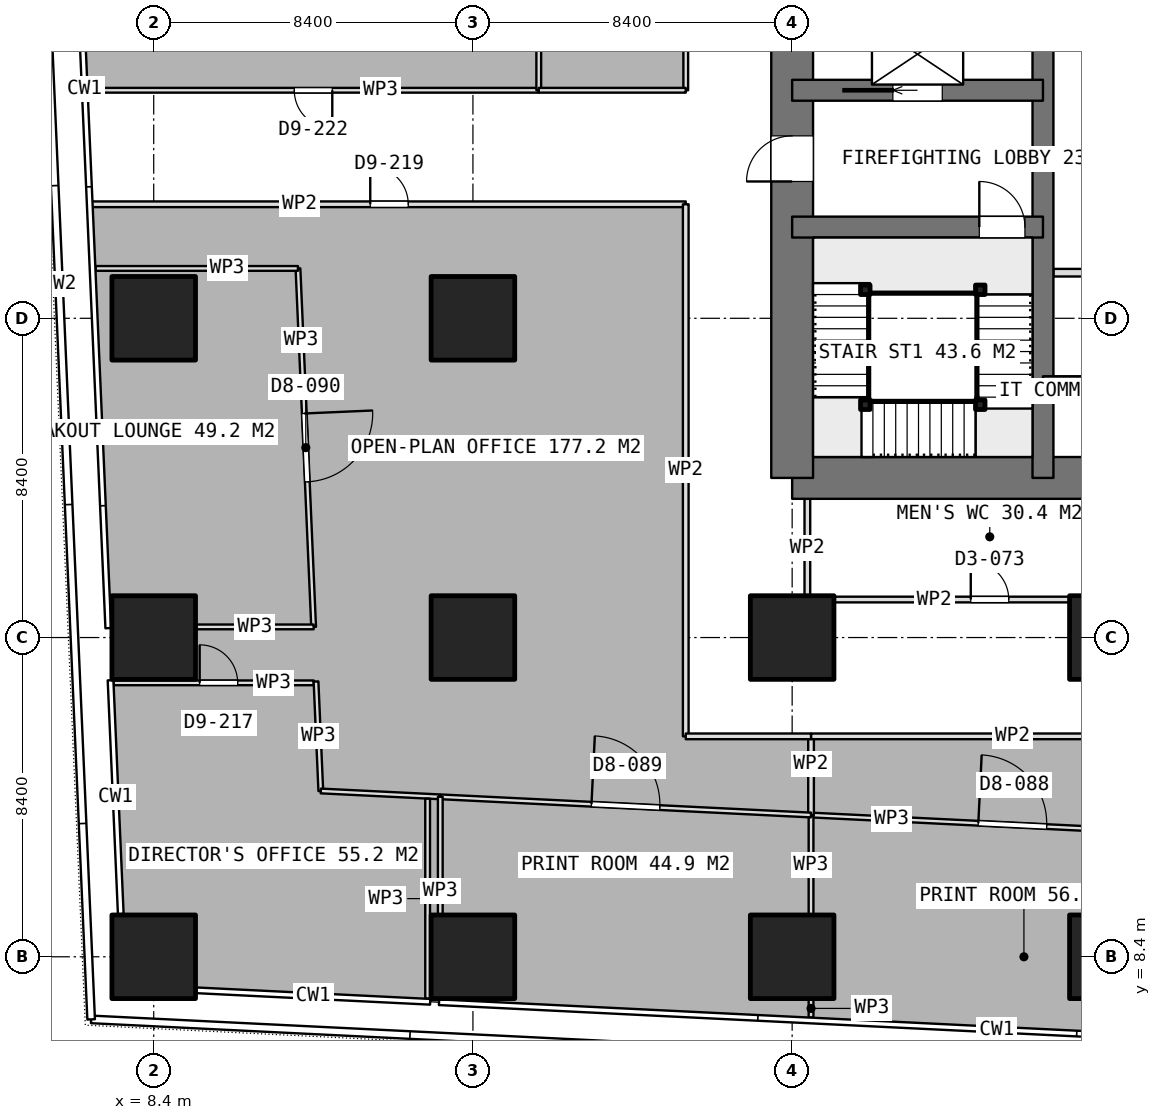
"""IFC4 building model, lengths in metres.
Left out: names, types, materials, properties, quantities, classifications, styles, units other than length and angle.
Written with IfcOpenShell. Run it as: python <this file> out.ifc"""

import sys

from ifc_helpers import new_model, si_unit, direction, frame, frame_2d, origin, origin_2d, place, context, subcontext, project, spatial, rectangle, extrude, element, fill, save


model = new_model("IFC4")
c1 = context("Model", 3, precision=1e-05, world=origin(), true_north=direction((0.0, 1.0)))
c2 = subcontext(c1, "Body", "Model", "MODEL_VIEW")
j1 = project(units=[si_unit("LENGTHUNIT", "METRE"), si_unit("PLANEANGLEUNIT", "RADIAN")], contexts=[c1])
p1 = place(None, origin())
s1 = spatial("IfcSite", under=j1, at=p1, CompositionType="ELEMENT")
p2 = place(p1, origin())
s2 = spatial("IfcBuilding", under=s1, at=p2, CompositionType="ELEMENT")
p3 = place(p2, frame((0.0, 0.0, 66.65)))
s3 = spatial("IfcBuildingStorey", under=s2, at=p3, CompositionType="ELEMENT", Elevation=66.65)
p4 = place(p3, frame((25.2, 21.0, 0.0), z_axis=(0.0, 0.0, 1.0), x_axis=(1.0, 0.0, 0.0)))
e1 = element("IfcWall", 1, at=p4, inside=s3, PredefinedType="SHEAR", context=c2, shape_type="SweptSolid", body=[
    extrude(rectangle(XDim=10.4, YDim=1.1, at=frame_2d((5.2, 0.0))), origin(), (0.0, 0.0, 1.0), 3.75),
])
p5 = place(p3, frame((25.2, 21.0, 0.0), z_axis=(0.0, 0.0, 1.0), x_axis=(0.0, 1.0, 0.0)))
e2 = element("IfcWall", 2, at=p5, inside=s3, PredefinedType="SHEAR", context=c2, shape_type="SweptSolid", body=[
    extrude(rectangle(XDim=25.2, YDim=1.1, at=frame_2d((12.6, 0.0))), origin(), (0.0, 0.0, 1.0), 3.75),
])
p6 = place(p5, frame((7.8, 0.0, 0.0)))
e3 = element("IfcOpeningElement", 3, at=p6, cuts=e2, PredefinedType="OPENING", context=c2, shape_type="SweptSolid", body=[
    extrude(rectangle(XDim=1.2, YDim=2.1, at=frame_2d((0.6, 1.05))), frame((0.0, 0.56, 0.0), z_axis=(0.0, -1.0, 0.0), x_axis=(1.0, 0.0, 0.0)), (0.0, 0.0, 1.0), 1.12),
])
p7 = place(p5, frame((14.25, 0.0, 0.0)))
e4 = element("IfcOpeningElement", 4, at=p7, cuts=e2, PredefinedType="OPENING", context=c2, shape_type="SweptSolid", body=[
    extrude(rectangle(XDim=0.9, YDim=2.1, at=frame_2d((0.45, 1.05))), frame((0.0, 0.56, 0.0), z_axis=(0.0, -1.0, 0.0), x_axis=(1.0, 0.0, 0.0)), (0.0, 0.0, 1.0), 1.12),
])
p8 = place(p5, frame((16.85, 0.0, 0.0)))
e5 = element("IfcOpeningElement", 5, at=p8, cuts=e2, PredefinedType="OPENING", context=c2, shape_type="SweptSolid", body=[
    extrude(rectangle(XDim=0.9, YDim=2.1, at=frame_2d((0.45, 1.05))), frame((0.0, 0.56, 0.0), z_axis=(0.0, -1.0, 0.0), x_axis=(1.0, 0.0, 0.0)), (0.0, 0.0, 1.0), 1.12),
])
p9 = place(p5, frame((19.075, 0.0, 0.0)))
e6 = element("IfcOpeningElement", 6, at=p9, cuts=e2, PredefinedType="OPENING", context=c2, shape_type="SweptSolid", body=[
    extrude(rectangle(XDim=1.2, YDim=2.1, at=frame_2d((0.6, 1.05))), frame((0.0, 0.56, 0.0), z_axis=(0.0, -1.0, 0.0), x_axis=(1.0, 0.0, 0.0)), (0.0, 0.0, 1.0), 1.12),
])
p10 = place(p3, frame((31.8, 21.0, 0.0), z_axis=(0.0, 0.0, 1.0), x_axis=(0.0, 1.0, 0.0)))
e7 = element("IfcWall", 7, at=p10, inside=s3, PredefinedType="SHEAR", context=c2, shape_type="SweptSolid", body=[
    extrude(rectangle(XDim=25.2, YDim=0.55, at=frame_2d((12.6, 0.0))), origin(), (0.0, 0.0, 1.0), 3.75),
])
p11 = place(p3, frame((31.8, 23.4, 0.0), z_axis=(0.0, 0.0, 1.0), x_axis=(1.0, 0.0, 0.0)))
e8 = element("IfcWall", 8, at=p11, inside=s3, PredefinedType="SHEAR", context=c2, shape_type="SweptSolid", body=[
    extrude(rectangle(XDim=3.8, YDim=0.55, at=frame_2d((1.9, 0.0))), origin(), (0.0, 0.0, 1.0), 3.75),
])
p12 = place(p3, frame((25.2, 27.6, 0.0), z_axis=(0.0, 0.0, 1.0), x_axis=(1.0, 0.0, 0.0)))
e9 = element("IfcWall", 9, at=p12, inside=s3, PredefinedType="SHEAR", context=c2, shape_type="SweptSolid", body=[
    extrude(rectangle(XDim=6.6, YDim=0.55, at=frame_2d((3.3, 0.0))), origin(), (0.0, 0.0, 1.0), 3.75),
])
p13 = place(p12, frame((4.925, 0.0, 0.0)))
e10 = element("IfcOpeningElement", 10, at=p13, cuts=e9, PredefinedType="OPENING", context=c2, shape_type="SweptSolid", body=[
    extrude(rectangle(XDim=1.2, YDim=2.1, at=frame_2d((0.6, 1.05))), frame((0.0, 0.285, 0.0), z_axis=(0.0, -1.0, 0.0), x_axis=(1.0, 0.0, 0.0)), (0.0, 0.0, 1.0), 0.57),
])
p14 = place(p3, frame((25.2, 31.2, 0.0), z_axis=(0.0, 0.0, 1.0), x_axis=(1.0, 0.0, 0.0)))
e11 = element("IfcWall", 11, at=p14, inside=s3, PredefinedType="SHEAR", context=c2, shape_type="SweptSolid", body=[
    extrude(rectangle(XDim=6.6, YDim=0.55, at=frame_2d((3.3, 0.0))), origin(), (0.0, 0.0, 1.0), 3.75),
])
p15 = place(p14, frame((2.65, 0.0, 0.0)))
e12 = element("IfcOpeningElement", 12, at=p15, cuts=e11, PredefinedType="OPENING", context=c2, shape_type="SweptSolid", body=[
    extrude(rectangle(XDim=1.3, YDim=2.1, at=frame_2d((0.65, 1.05))), frame((0.0, 0.285, 0.0), z_axis=(0.0, -1.0, 0.0), x_axis=(1.0, 0.0, 0.0)), (0.0, 0.0, 1.0), 0.57),
])
for number, where, z_axis, x_axis in (
    (13, (8.4, 8.4, 0.0), (0.0, 0.0, 1.0), (1.0, 0.0, 0.0)),
    (14, (8.4, 16.8, 0.0), (0.0, 0.0, 1.0), (1.0, 0.0, 0.0)),
    (15, (8.4, 25.2, 0.0), (0.0, 0.0, 1.0), (1.0, 0.0, 0.0)),
    (16, (16.8, 8.4, 0.0), (0.0, 0.0, 1.0), (1.0, 0.0, 0.0)),
    (17, (16.8, 16.8, 0.0), (0.0, 0.0, 1.0), (1.0, 0.0, 0.0)),
    (18, (16.8, 25.2, 0.0), (0.0, 0.0, 1.0), (1.0, 0.0, 0.0)),
    (19, (25.2, 8.4, 0.0), (0.0, 0.0, 1.0), (1.0, 0.0, 0.0)),
    (20, (25.2, 16.8, 0.0), (0.0, 0.0, 1.0), (1.0, 0.0, 0.0)),
    (21, (33.6, 8.4, 0.0), (0.0, 0.0, 1.0), (1.0, 0.0, 0.0)),
    (22, (33.6, 16.8, 0.0), (0.0, 0.0, 1.0), (1.0, 0.0, 0.0)),
):
    element("IfcColumn", number, at=place(p3, frame(where, z_axis=z_axis, x_axis=x_axis)), inside=s3, PredefinedType="COLUMN", context=c2, shape_type="SweptSolid", body=[
        extrude(rectangle(XDim=2.2, YDim=2.2, at=origin_2d()), origin(), (0.0, 0.0, 1.0), 3.75),
    ])
for number, where, z_axis, x_axis in (
    (23, (32.075, 26.4, 0.0), (0.0, 0.0, 1.0), (1.0, 0.0, 0.0)),
    (24, (32.075, 29.4, 0.0), (0.0, 0.0, 1.0), (1.0, 0.0, 0.0)),
):
    element("IfcWall", number, at=place(p3, frame(where, z_axis=z_axis, x_axis=x_axis)), inside=s3, PredefinedType="PARTITIONING", context=c2, shape_type="SweptSolid", body=[
        extrude(rectangle(XDim=3.25, YDim=0.2, at=frame_2d((1.625, 0.0))), origin(), (0.0, 0.0, 1.0), 3.5),
    ])
p16 = place(p3, frame((25.525, 17.8, 0.0), z_axis=(0.0, 0.0, 1.0), x_axis=(1.0, 0.0, 0.0)))
e25 = element("IfcWall", 25, at=p16, inside=s3, PredefinedType="PARTITIONING", context=c2, shape_type="SweptSolid", body=[
    extrude(rectangle(XDim=9.75, YDim=0.15, at=frame_2d((4.875, 0.0))), origin(), (0.0, 0.0, 1.0), 3.5),
])
p17 = place(p16, frame((4.375, 0.0, 0.0)))
e26 = element("IfcOpeningElement", 26, at=p17, cuts=e25, PredefinedType="OPENING", context=c2, shape_type="SweptSolid", body=[
    extrude(rectangle(XDim=1.0, YDim=2.1, at=frame_2d((0.5, 1.05))), frame((0.0, 0.085, 0.0), z_axis=(0.0, -1.0, 0.0), x_axis=(1.0, 0.0, 0.0)), (0.0, 0.0, 1.0), 0.17),
])
p18 = place(p3, frame((25.6, 17.875, 0.0), z_axis=(0.0, 0.0, 1.0), x_axis=(0.0, 1.0, 0.0)))
e27 = element("IfcWall", 27, at=p18, inside=s3, PredefinedType="PARTITIONING", context=c2, shape_type="SweptSolid", body=[
    extrude(rectangle(XDim=2.575, YDim=0.15, at=frame_2d((1.288, 0.0))), origin(), (0.0, 0.0, 1.0), 3.5),
])
p19 = place(p3, frame((25.697, 12.13, 0.0), z_axis=(0.0, 0.0, 1.0), x_axis=(0.99879453849, -0.049086351277, 0.0)))
e28 = element("IfcWall", 28, at=p19, inside=s3, PredefinedType="PARTITIONING", context=c2, shape_type="SweptSolid", body=[
    extrude(rectangle(XDim=10.614, YDim=0.125, at=frame_2d((5.307, 0.0))), origin(), (0.0, 0.0, 1.0), 3.5),
])
p20 = place(p19, frame((4.407, 0.0, 0.0)))
e29 = element("IfcOpeningElement", 29, at=p20, cuts=e28, PredefinedType="OPENING", context=c2, shape_type="SweptSolid", body=[
    extrude(rectangle(XDim=1.8, YDim=2.1, at=frame_2d((0.9, 1.05))), frame((0.0, 0.073, 0.0), z_axis=(0.0, -1.0, 0.0), x_axis=(1.0, 0.0, 0.0)), (0.0, 0.0, 1.0), 0.145),
])
p21 = place(p3, frame((25.697, 6.803, 0.0), z_axis=(0.0, 0.0, 1.0), x_axis=(0.0, 1.0, 0.0)))
e30 = element("IfcWall", 30, at=p21, inside=s3, PredefinedType="PARTITIONING", context=c2, shape_type="SweptSolid", body=[
    extrude(rectangle(XDim=0.477, YDim=0.125, at=frame_2d((0.239, 0.0))), origin(), (0.0, 0.0, 1.0), 3.5),
])
p22 = place(p3, frame((25.697, 9.52, 0.0), z_axis=(0.0, 0.0, 1.0), x_axis=(0.0, 1.0, 0.0)))
e31 = element("IfcWall", 31, at=p22, inside=s3, PredefinedType="PARTITIONING", context=c2, shape_type="SweptSolid", body=[
    extrude(rectangle(XDim=2.61, YDim=0.125, at=frame_2d((1.305, 0.0))), origin(), (0.0, 0.0, 1.0), 3.5),
])
p23 = place(p3, frame((25.697, 12.13, 0.0), z_axis=(0.0, 0.0, 1.0), x_axis=(0.0, 1.0, 0.0)))
e32 = element("IfcWall", 32, at=p23, inside=s3, PredefinedType="PARTITIONING", context=c2, shape_type="SweptSolid", body=[
    extrude(rectangle(XDim=2.07, YDim=0.15, at=frame_2d((1.035, 0.0))), origin(), (0.0, 0.0, 1.0), 3.5),
])
p24 = place(p3, frame((25.697, 14.2, 0.0), z_axis=(0.0, 0.0, 1.0), x_axis=(1.0, 0.0, 0.0)))
e33 = element("IfcWall", 33, at=p24, inside=s3, PredefinedType="PARTITIONING", context=c2, shape_type="SweptSolid", body=[
    extrude(rectangle(XDim=10.603, YDim=0.15, at=frame_2d((5.302, 0.0))), origin(), (0.0, 0.0, 1.0), 3.5),
])
p25 = place(p3, frame((18.532, 31.2, 0.0), z_axis=(0.0, 0.0, 1.0), x_axis=(-1.0, 0.0, 0.0)))
e34 = element("IfcWall", 34, at=p25, inside=s3, PredefinedType="PARTITIONING", context=c2, shape_type="SweptSolid", body=[
    extrude(rectangle(XDim=11.897, YDim=0.125, at=frame_2d((5.948, 0.0))), origin(), (0.0, 0.0, 1.0), 3.5),
])
p26 = place(p25, frame((5.433, 0.0, 0.0)))
e35 = element("IfcOpeningElement", 35, at=p26, cuts=e34, PredefinedType="OPENING", context=c2, shape_type="SweptSolid", body=[
    extrude(rectangle(XDim=1.0, YDim=2.1, at=frame_2d((0.5, 1.05))), frame((0.0, 0.073, 0.0), z_axis=(0.0, -1.0, 0.0), x_axis=(1.0, 0.0, 0.0)), (0.0, 0.0, 1.0), 0.145),
])
p27 = place(p3, frame((18.532, 56.059, 0.0), z_axis=(0.0, 0.0, 1.0), x_axis=(0.0, -1.0, 0.0)))
e36 = element("IfcWall", 36, at=p27, inside=s3, PredefinedType="PARTITIONING", context=c2, shape_type="SweptSolid", body=[
    extrude(rectangle(XDim=24.859, YDim=0.125, at=frame_2d((12.43, 0.0))), origin(), (0.0, 0.0, 1.0), 3.5),
])
p28 = place(p3, frame((22.4, 56.431, 0.0), z_axis=(0.0, 0.0, 1.0), x_axis=(0.0, -1.0, 0.0)))
e37 = element("IfcWall", 37, at=p28, inside=s3, PredefinedType="PARTITIONING", context=c2, shape_type="SweptSolid", body=[
    extrude(rectangle(XDim=25.231, YDim=0.125, at=frame_2d((12.615, 0.0))), origin(), (0.0, 0.0, 1.0), 3.5),
])
p29 = place(p28, frame((11.684, 0.0, 0.0)))
e38 = element("IfcOpeningElement", 38, at=p29, cuts=e37, PredefinedType="OPENING", context=c2, shape_type="SweptSolid", body=[
    extrude(rectangle(XDim=1.8, YDim=2.1, at=frame_2d((0.9, 1.05))), frame((0.0, 0.073, 0.0), z_axis=(0.0, -1.0, 0.0), x_axis=(1.0, 0.0, 0.0)), (0.0, 0.0, 1.0), 0.145),
])
p30 = place(p3, frame((22.4, 31.2, 0.0), z_axis=(0.0, 0.0, 1.0), x_axis=(-1.0, 0.0, 0.0)))
e39 = element("IfcWall", 39, at=p30, inside=s3, PredefinedType="PARTITIONING", context=c2, shape_type="SweptSolid", body=[
    extrude(rectangle(XDim=3.868, YDim=0.125, at=frame_2d((1.934, 0.0))), origin(), (0.0, 0.0, 1.0), 3.5),
])
p31 = place(p3, frame((12.196, 26.512, 0.0), z_axis=(0.0, 0.0, 1.0), x_axis=(0.043625757269, -0.999047943445, 0.0)))
e40 = element("IfcWall", 40, at=p31, inside=s3, PredefinedType="PARTITIONING", context=c2, shape_type="SweptSolid", body=[
    extrude(rectangle(XDim=9.441, YDim=0.125, at=frame_2d((4.72, 0.0))), origin(), (0.0, 0.0, 1.0), 3.5),
])
p32 = place(p31, frame((3.82, 0.0, 0.0)))
e41 = element("IfcOpeningElement", 41, at=p32, cuts=e40, PredefinedType="OPENING", context=c2, shape_type="SweptSolid", body=[
    extrude(rectangle(XDim=1.8, YDim=2.1, at=frame_2d((0.9, 1.05))), frame((0.0, 0.073, 0.0), z_axis=(0.0, -1.0, 0.0), x_axis=(1.0, 0.0, 0.0)), (0.0, 0.0, 1.0), 0.145),
])
p33 = place(p3, frame((12.608, 17.08, 0.0), z_axis=(0.0, 0.0, 1.0), x_axis=(-1.0, 0.0, 0.0)))
e42 = element("IfcWall", 42, at=p33, inside=s3, PredefinedType="PARTITIONING", context=c2, shape_type="SweptSolid", body=[
    extrude(rectangle(XDim=3.088, YDim=0.125, at=frame_2d((1.544, 0.0))), origin(), (0.0, 0.0, 1.0), 3.5),
])
p34 = place(p3, frame((6.871, 26.512, 0.0), z_axis=(0.0, 0.0, 1.0), x_axis=(1.0, 0.0, 0.0)))
e43 = element("IfcWall", 43, at=p34, inside=s3, PredefinedType="PARTITIONING", context=c2, shape_type="SweptSolid", body=[
    extrude(rectangle(XDim=5.325, YDim=0.125, at=frame_2d((2.663, 0.0))), origin(), (0.0, 0.0, 1.0), 3.5),
])
p35 = place(p3, frame((7.347, 15.608, 0.0), z_axis=(0.0, 0.0, 1.0), x_axis=(1.0, 0.0, 0.0)))
e44 = element("IfcWall", 44, at=p35, inside=s3, PredefinedType="PARTITIONING", context=c2, shape_type="SweptSolid", body=[
    extrude(rectangle(XDim=5.263, YDim=0.125, at=frame_2d((2.632, 0.0))), origin(), (0.0, 0.0, 1.0), 3.5),
])
p36 = place(p35, frame((2.262, 0.0, 0.0)))
e45 = element("IfcOpeningElement", 45, at=p36, cuts=e44, PredefinedType="OPENING", context=c2, shape_type="SweptSolid", body=[
    extrude(rectangle(XDim=1.0, YDim=2.1, at=frame_2d((0.5, 1.05))), frame((0.0, 0.073, 0.0), z_axis=(0.0, -1.0, 0.0), x_axis=(1.0, 0.0, 0.0)), (0.0, 0.0, 1.0), 0.145),
])
p37 = place(p3, frame((12.671, 15.643, 0.0), z_axis=(0.0, 0.0, 1.0), x_axis=(0.043782676762, -0.999041078843, 0.0)))
e46 = element("IfcWall", 46, at=p37, inside=s3, PredefinedType="PARTITIONING", context=c2, shape_type="SweptSolid", body=[
    extrude(rectangle(XDim=2.883, YDim=0.125, at=frame_2d((1.441, 0.0))), origin(), (0.0, 0.0, 1.0), 3.5),
])
p38 = place(p3, frame((12.797, 12.763, 0.0), z_axis=(0.0, 0.0, 1.0), x_axis=(0.998790140287, -0.049175762993, 0.0)))
e47 = element("IfcWall", 47, at=p38, inside=s3, PredefinedType="PARTITIONING", context=c2, shape_type="SweptSolid", body=[
    extrude(rectangle(XDim=3.133, YDim=0.125, at=frame_2d((1.566, 0.0))), origin(), (0.0, 0.0, 1.0), 3.5),
])
p39 = place(p3, frame((15.608, 12.562, 0.0), z_axis=(0.0, 0.0, 1.0), x_axis=(0.0, -1.0, 0.0)))
e48 = element("IfcWall", 48, at=p39, inside=s3, PredefinedType="PARTITIONING", context=c2, shape_type="SweptSolid", body=[
    extrude(rectangle(XDim=5.263, YDim=0.125, at=frame_2d((2.631, 0.0))), origin(), (0.0, 0.0, 1.0), 3.5),
])
p40 = place(p3, frame((15.941, 12.609, 0.0), z_axis=(0.0, 0.0, 1.0), x_axis=(0.998796633854, -0.049043696865, 0.0)))
e49 = element("IfcWall", 49, at=p40, inside=s3, PredefinedType="PARTITIONING", context=c2, shape_type="SweptSolid", body=[
    extrude(rectangle(XDim=9.767, YDim=0.125, at=frame_2d((4.883, 0.0))), origin(), (0.0, 0.0, 1.0), 3.5),
])
p41 = place(p40, frame((3.983, 0.0, 0.0)))
e50 = element("IfcOpeningElement", 50, at=p41, cuts=e49, PredefinedType="OPENING", context=c2, shape_type="SweptSolid", body=[
    extrude(rectangle(XDim=1.8, YDim=2.1, at=frame_2d((0.9, 1.05))), frame((0.0, 0.073, 0.0), z_axis=(0.0, -1.0, 0.0), x_axis=(1.0, 0.0, 0.0)), (0.0, 0.0, 1.0), 0.145),
])
p42 = place(p3, frame((15.941, 9.52, 0.0), z_axis=(0.0, 0.0, 1.0), x_axis=(0.0, 1.0, 0.0)))
e51 = element("IfcWall", 51, at=p42, inside=s3, PredefinedType="PARTITIONING", context=c2, shape_type="SweptSolid", body=[
    extrude(rectangle(XDim=3.089, YDim=0.125, at=frame_2d((1.544, 0.0))), origin(), (0.0, 0.0, 1.0), 3.5),
])
p43 = place(p3, frame((6.767, 28.2, 0.0), z_axis=(0.0, 0.0, 1.0), x_axis=(1.0, 0.0, 0.0)))
e52 = element("IfcWall", 52, at=p43, inside=s3, PredefinedType="PARTITIONING", context=c2, shape_type="SweptSolid", body=[
    extrude(rectangle(XDim=15.633, YDim=0.15, at=frame_2d((7.816, 0.0))), origin(), (0.0, 0.0, 1.0), 3.5),
])
p44 = place(p43, frame((7.331, 0.0, 0.0)))
e53 = element("IfcOpeningElement", 53, at=p44, cuts=e52, PredefinedType="OPENING", context=c2, shape_type="SweptSolid", body=[
    extrude(rectangle(XDim=1.0, YDim=2.1, at=frame_2d((0.5, 1.05))), frame((0.0, 0.085, 0.0), z_axis=(0.0, -1.0, 0.0), x_axis=(1.0, 0.0, 0.0)), (0.0, 0.0, 1.0), 0.17),
])
p45 = place(p3, frame((22.4, 28.2, 0.0), z_axis=(0.0, 0.0, 1.0), x_axis=(0.0, -1.0, 0.0)))
e54 = element("IfcWall", 54, at=p45, inside=s3, PredefinedType="PARTITIONING", context=c2, shape_type="SweptSolid", body=[
    extrude(rectangle(XDim=14.0, YDim=0.15, at=frame_2d((7.0, 0.0))), origin(), (0.0, 0.0, 1.0), 3.5),
])
p46 = place(p3, frame((22.4, 14.2, 0.0), z_axis=(0.0, 0.0, 1.0), x_axis=(1.0, 0.0, 0.0)))
e55 = element("IfcWall", 55, at=p46, inside=s3, PredefinedType="PARTITIONING", context=c2, shape_type="SweptSolid", body=[
    extrude(rectangle(XDim=3.296, YDim=0.15, at=frame_2d((1.648, 0.0))), origin(), (0.0, 0.0, 1.0), 3.5),
])
for number, where, z_axis, x_axis in (
    (56, (30.15, 25.95, 0.0), (0.0, 0.0, 1.0), (1.0, 0.0, 0.0)),
    (57, (30.15, 22.925, 0.0), (0.0, 0.0, 1.0), (1.0, 0.0, 0.0)),
    (58, (27.125, 22.925, 0.0), (0.0, 0.0, 1.0), (1.0, 0.0, 0.0)),
    (59, (27.125, 25.95, 0.0), (0.0, 0.0, 1.0), (1.0, 0.0, 0.0)),
):
    element("IfcColumn", number, at=place(p3, frame(where, z_axis=z_axis, x_axis=x_axis)), inside=s3, PredefinedType="COLUMN", context=c2, shape_type="SweptSolid", body=[
        extrude(rectangle(XDim=0.25, YDim=0.25, at=origin_2d()), origin(), (0.0, 0.0, 1.0), 3.75),
    ])
p47 = place(p6, origin())
e60 = element("IfcDoor", 60, at=p47, inside=s3, OperationType="SINGLE_SWING_LEFT", PredefinedType="DOOR", context=c2, shape_type="SweptSolid", body=[
    extrude(rectangle(XDim=1.2, YDim=2.1, at=frame_2d((0.6, 1.05))), frame((0.0, 0.025, 0.0), z_axis=(0.0, -1.0, 0.0), x_axis=(1.0, 0.0, 0.0)), (0.0, 0.0, 1.0), 0.05),
])
fill(e3, e60)
p48 = place(p15, origin())
e61 = element("IfcDoor", 61, at=p48, inside=s3, OperationType="SLIDING_TO_LEFT", PredefinedType="USERDEFINED", context=c2, shape_type="SweptSolid", body=[
    extrude(rectangle(XDim=1.3, YDim=2.1, at=frame_2d((0.65, 1.05))), frame((0.0, 0.025, 0.0), z_axis=(0.0, -1.0, 0.0), x_axis=(1.0, 0.0, 0.0)), (0.0, 0.0, 1.0), 0.05),
])
fill(e12, e61)
p49 = place(p17, origin())
e62 = element("IfcDoor", 62, at=p49, inside=s3, OperationType="SINGLE_SWING_LEFT", PredefinedType="DOOR", context=c2, shape_type="SweptSolid", body=[
    extrude(rectangle(XDim=1.0, YDim=2.1, at=frame_2d((0.5, 1.05))), frame((0.0, 0.025, 0.0), z_axis=(0.0, -1.0, 0.0), x_axis=(1.0, 0.0, 0.0)), (0.0, 0.0, 1.0), 0.05),
])
fill(e26, e62)
p50 = place(p20, origin())
e63 = element("IfcDoor", 63, at=p50, inside=s3, OperationType="DOUBLE_DOOR_SINGLE_SWING", PredefinedType="DOOR", context=c2, shape_type="SweptSolid", body=[
    extrude(rectangle(XDim=1.8, YDim=2.1, at=frame_2d((0.9, 1.05))), frame((0.0, 0.025, 0.0), z_axis=(0.0, -1.0, 0.0), x_axis=(1.0, 0.0, 0.0)), (0.0, 0.0, 1.0), 0.05),
])
fill(e29, e63)
p51 = place(p26, origin())
e64 = element("IfcDoor", 64, at=p51, inside=s3, OperationType="SINGLE_SWING_LEFT", PredefinedType="DOOR", context=c2, shape_type="SweptSolid", body=[
    extrude(rectangle(XDim=1.0, YDim=2.1, at=frame_2d((0.5, 1.05))), frame((0.0, 0.025, 0.0), z_axis=(0.0, -1.0, 0.0), x_axis=(1.0, 0.0, 0.0)), (0.0, 0.0, 1.0), 0.05),
])
fill(e35, e64)
p52 = place(p32, origin())
e65 = element("IfcDoor", 65, at=p52, inside=s3, OperationType="DOUBLE_DOOR_SINGLE_SWING", PredefinedType="DOOR", context=c2, shape_type="SweptSolid", body=[
    extrude(rectangle(XDim=1.8, YDim=2.1, at=frame_2d((0.9, 1.05))), frame((0.0, 0.025, 0.0), z_axis=(0.0, -1.0, 0.0), x_axis=(1.0, 0.0, 0.0)), (0.0, 0.0, 1.0), 0.05),
])
fill(e41, e65)
p53 = place(p36, origin())
e66 = element("IfcDoor", 66, at=p53, inside=s3, OperationType="SINGLE_SWING_LEFT", PredefinedType="DOOR", context=c2, shape_type="SweptSolid", body=[
    extrude(rectangle(XDim=1.0, YDim=2.1, at=frame_2d((0.5, 1.05))), frame((0.0, 0.025, 0.0), z_axis=(0.0, -1.0, 0.0), x_axis=(1.0, 0.0, 0.0)), (0.0, 0.0, 1.0), 0.05),
])
fill(e45, e66)
p54 = place(p41, origin())
e67 = element("IfcDoor", 67, at=p54, inside=s3, OperationType="DOUBLE_DOOR_SINGLE_SWING", PredefinedType="DOOR", context=c2, shape_type="SweptSolid", body=[
    extrude(rectangle(XDim=1.8, YDim=2.1, at=frame_2d((0.9, 1.05))), frame((0.0, 0.025, 0.0), z_axis=(0.0, -1.0, 0.0), x_axis=(1.0, 0.0, 0.0)), (0.0, 0.0, 1.0), 0.05),
])
fill(e50, e67)
p55 = place(p44, origin())
e68 = element("IfcDoor", 68, at=p55, inside=s3, OperationType="SINGLE_SWING_LEFT", PredefinedType="DOOR", context=c2, shape_type="SweptSolid", body=[
    extrude(rectangle(XDim=1.0, YDim=2.1, at=frame_2d((0.5, 1.05))), frame((0.0, 0.025, 0.0), z_axis=(0.0, -1.0, 0.0), x_axis=(1.0, 0.0, 0.0)), (0.0, 0.0, 1.0), 0.05),
])
fill(e53, e68)
p56 = place(p13, origin())
e69 = element("IfcDoor", 69, at=p56, inside=s3, OperationType="SINGLE_SWING_RIGHT", PredefinedType="DOOR", context=c2, shape_type="SweptSolid", body=[
    extrude(rectangle(XDim=1.2, YDim=2.1, at=frame_2d((0.6, 1.05))), frame((0.0, 0.025, 0.0), z_axis=(0.0, -1.0, 0.0), x_axis=(1.0, 0.0, 0.0)), (0.0, 0.0, 1.0), 0.05),
])
fill(e10, e69)
save(model, sys.argv[1])
